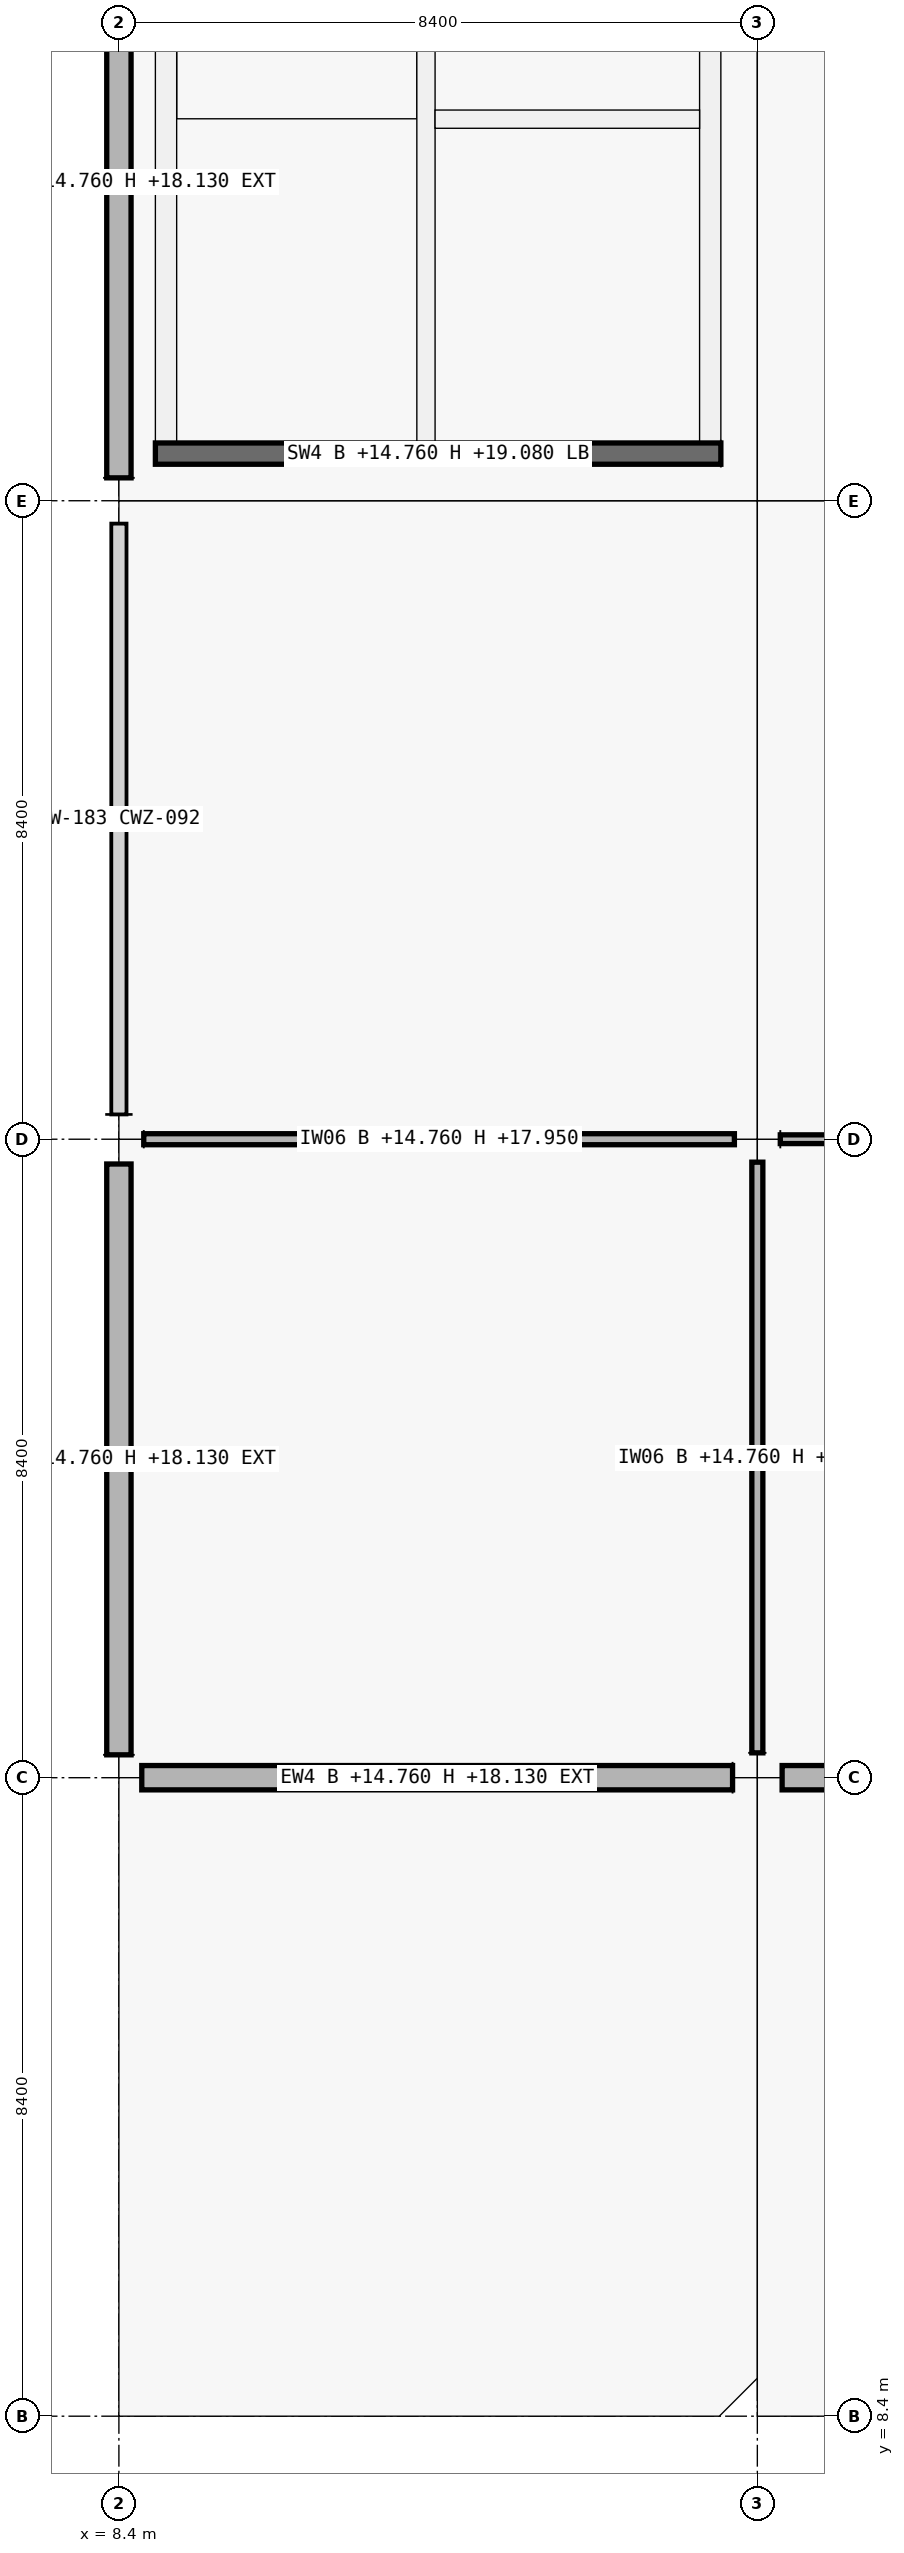
"""IFC4 building model, lengths in metres.
Left out: names, types, materials, properties, quantities, classifications, styles, units other than length and angle.
Written with IfcOpenShell. Run it as: python <this file> out.ifc"""

import sys

from ifc_helpers import new_model, si_unit, direction, frame, frame_2d, origin, origin_2d, place, context, subcontext, project, spatial, rectangle, extrude, element, fill, save


model = new_model("IFC4")
c1 = context("Model", 3, precision=1e-05, world=origin(), true_north=direction((0.0, 1.0)))
c2 = subcontext(c1, "Body", "Model", "MODEL_VIEW")
j1 = project(units=[si_unit("LENGTHUNIT", "METRE"), si_unit("PLANEANGLEUNIT", "RADIAN")], contexts=[c1])
p1 = place(None, origin())
s1 = spatial("IfcSite", under=j1, at=p1, CompositionType="ELEMENT")
p2 = place(p1, origin())
s2 = spatial("IfcBuilding", under=s1, at=p2, CompositionType="ELEMENT")
p3 = place(p2, frame((0.0, 0.0, 14.76)))
s3 = spatial("IfcBuildingStorey", under=s2, at=p3, CompositionType="ELEMENT", Elevation=14.76)
p4 = place(p3, frame((8.4, 16.8, 0.0), z_axis=(0.0, 0.0, 1.0), x_axis=(1.0, 0.0, 0.0)))
e1 = element("IfcColumn", 1, at=p4, inside=s3, PredefinedType="COLUMN", context=c2, shape_type="SweptSolid", body=[
    extrude(rectangle(XDim=0.6, YDim=0.6, at=origin_2d()), origin(), (0.0, 0.0, 1.0), 4.32),
])
p5 = place(p3, frame((8.4, 25.2, 0.0), z_axis=(0.0, 0.0, 1.0), x_axis=(1.0, 0.0, 0.0)))
e2 = element("IfcColumn", 2, at=p5, inside=s3, PredefinedType="COLUMN", context=c2, shape_type="SweptSolid", body=[
    extrude(rectangle(XDim=0.65, YDim=0.65, at=origin_2d()), origin(), (0.0, 0.0, 1.0), 4.32),
])
p6 = place(p3, frame((8.4, 33.6, 0.0), z_axis=(0.0, 0.0, 1.0), x_axis=(1.0, 0.0, 0.0)))
e3 = element("IfcColumn", 3, at=p6, inside=s3, PredefinedType="COLUMN", context=c2, shape_type="SweptSolid", body=[
    extrude(rectangle(XDim=0.6, YDim=0.6, at=origin_2d()), origin(), (0.0, 0.0, 1.0), 4.32),
])
p7 = place(p3, frame((16.8, 16.8, 0.0), z_axis=(0.0, 0.0, 1.0), x_axis=(1.0, 0.0, 0.0)))
e4 = element("IfcColumn", 4, at=p7, inside=s3, PredefinedType="COLUMN", context=c2, shape_type="SweptSolid", body=[
    extrude(rectangle(XDim=0.65, YDim=0.65, at=origin_2d()), origin(), (0.0, 0.0, 1.0), 4.32),
])
p8 = place(p3, frame((16.8, 25.2, 0.0), z_axis=(0.0, 0.0, 1.0), x_axis=(1.0, 0.0, 0.0)))
e5 = element("IfcColumn", 5, at=p8, inside=s3, PredefinedType="COLUMN", context=c2, shape_type="SweptSolid", body=[
    extrude(rectangle(XDim=0.6, YDim=0.6, at=origin_2d()), origin(), (0.0, 0.0, 1.0), 4.32),
])
p9 = place(p3, frame((16.8, 33.6, 0.0), z_axis=(0.0, 0.0, 1.0), x_axis=(1.0, 0.0, 0.0)))
e6 = element("IfcColumn", 6, at=p9, inside=s3, PredefinedType="COLUMN", context=c2, shape_type="SweptSolid", body=[
    extrude(rectangle(XDim=0.65, YDim=0.65, at=origin_2d()), origin(), (0.0, 0.0, 1.0), 4.32),
])
p10 = place(p3, frame((16.474, 16.8, 0.0), z_axis=(0.0, 0.0, 1.0), x_axis=(-1.0, 0.0, 0.0)))
e7 = element("IfcWall", 7, at=p10, inside=s3, PredefinedType="SOLIDWALL", context=c2, shape_type="SweptSolid", body=[
    extrude(rectangle(XDim=7.773, YDim=0.32, at=frame_2d((3.887, 0.0))), origin(), (0.0, 0.0, 1.0), 3.37),
])
p11 = place(p10, frame((2.962, 0.0, 0.0)))
e8 = element("IfcOpeningElement", 8, at=p11, cuts=e7, PredefinedType="OPENING", context=c2, shape_type="SweptSolid", body=[
    extrude(rectangle(XDim=1.85, YDim=2.2, at=frame_2d((0.925, 1.1))), frame((0.0, 0.16, 0.0), z_axis=(0.0, -1.0, 0.0), x_axis=(1.0, 0.0, 0.0)), (0.0, 0.0, 1.0), 0.32),
])
p12 = place(p3, frame((8.4, 17.101, 0.0), z_axis=(0.0, 0.0, 1.0), x_axis=(0.0, 1.0, 0.0)))
e9 = element("IfcWall", 9, at=p12, inside=s3, PredefinedType="SOLIDWALL", context=c2, shape_type="SweptSolid", body=[
    extrude(rectangle(XDim=7.773, YDim=0.32, at=frame_2d((3.886, 0.0))), origin(), (0.0, 0.0, 1.0), 3.37),
])
p13 = place(p12, frame((2.386, 0.0, 0.9)))
e10 = element("IfcOpeningElement", 10, at=p13, cuts=e9, PredefinedType="OPENING", context=c2, shape_type="SweptSolid", body=[
    extrude(rectangle(XDim=3.0, YDim=1.2, at=frame_2d((1.5, 0.6))), frame((0.0, 0.16, 0.0), z_axis=(0.0, -1.0, 0.0), x_axis=(1.0, 0.0, 0.0)), (0.0, 0.0, 1.0), 0.32),
])
p14 = place(p3, frame((8.4, 33.901, 0.0), z_axis=(0.0, 0.0, 1.0), x_axis=(0.0, 1.0, 0.0)))
e11 = element("IfcWall", 11, at=p14, inside=s3, PredefinedType="SOLIDWALL", context=c2, shape_type="SweptSolid", body=[
    extrude(rectangle(XDim=7.773, YDim=0.32, at=frame_2d((3.887, 0.0))), origin(), (0.0, 0.0, 1.0), 3.37),
])
p15 = place(p3, frame((24.899, 16.8, 0.0), z_axis=(0.0, 0.0, 1.0), x_axis=(-1.0, 0.0, 0.0)))
e12 = element("IfcWall", 12, at=p15, inside=s3, PredefinedType="SOLIDWALL", context=c2, shape_type="SweptSolid", body=[
    extrude(rectangle(XDim=7.773, YDim=0.32, at=frame_2d((3.886, 0.0))), origin(), (0.0, 0.0, 1.0), 3.37),
])
p16 = place(p15, frame((3.061, 0.0, 0.0)))
e13 = element("IfcOpeningElement", 13, at=p16, cuts=e12, PredefinedType="OPENING", context=c2, shape_type="SweptSolid", body=[
    extrude(rectangle(XDim=1.65, YDim=2.2, at=frame_2d((0.825, 1.1))), frame((0.0, 0.16, 0.0), z_axis=(0.0, -1.0, 0.0), x_axis=(1.0, 0.0, 0.0)), (0.0, 0.0, 1.0), 0.32),
])
p17 = place(p3, frame((16.32, 34.22, 0.0), z_axis=(0.0, 0.0, 1.0), x_axis=(-1.0, 0.0, 0.0)))
e14 = element("IfcWall", 14, at=p17, inside=s3, PredefinedType="SHEAR", context=c2, shape_type="SweptSolid", body=[
    extrude(rectangle(XDim=7.44, YDim=0.28, at=frame_2d((3.72, 0.0))), origin(), (0.0, 0.0, 1.0), 4.32),
])
p18 = place(p17, frame((1.28, 0.0, 0.0)))
e15 = element("IfcOpeningElement", 15, at=p18, cuts=e14, PredefinedType="OPENING", context=c2, shape_type="SweptSolid", body=[
    extrude(rectangle(XDim=1.5, YDim=2.15, at=frame_2d((0.75, 1.075))), frame((0.0, 0.14, 0.0), z_axis=(0.0, -1.0, 0.0), x_axis=(1.0, 0.0, 0.0)), (0.0, 0.0, 1.0), 0.28),
])
for number, where, z_axis, x_axis in (
    (16, (9.02, 34.36, 0.0), (0.0, 0.0, 1.0), (0.0, 1.0, 0.0)),
    (17, (16.18, 41.24, 0.0), (0.0, 0.0, 1.0), (0.0, -1.0, 0.0)),
):
    element("IfcWall", number, at=place(p3, frame(where, z_axis=z_axis, x_axis=x_axis)), inside=s3, PredefinedType="SHEAR", context=c2, shape_type="SweptSolid", body=[
        extrude(rectangle(XDim=6.88, YDim=0.28, at=frame_2d((3.44, 0.0))), origin(), (0.0, 0.0, 1.0), 4.32),
    ])
p19 = place(p3, frame((12.44, 34.36, 0.0), z_axis=(0.0, 0.0, 1.0), x_axis=(0.0, 1.0, 0.0)))
e18 = element("IfcWall", 18, at=p19, inside=s3, PredefinedType="SHEAR", context=c2, shape_type="SweptSolid", body=[
    extrude(rectangle(XDim=6.88, YDim=0.24, at=frame_2d((3.44, 0.0))), origin(), (0.0, 0.0, 1.0), 4.32),
])
p20 = place(p19, frame((0.12, 0.0, 0.0)))
e19 = element("IfcOpeningElement", 19, at=p20, cuts=e18, PredefinedType="OPENING", context=c2, shape_type="SweptSolid", body=[
    extrude(rectangle(XDim=1.0, YDim=2.15, at=frame_2d((0.5, 1.075))), frame((0.0, 0.12, 0.0), z_axis=(0.0, -1.0, 0.0), x_axis=(1.0, 0.0, 0.0)), (0.0, 0.0, 1.0), 0.24),
])
p21 = place(p3, frame((12.56, 38.62, 0.0), z_axis=(0.0, 0.0, 1.0), x_axis=(1.0, 0.0, 0.0)))
e20 = element("IfcWall", 20, at=p21, inside=s3, PredefinedType="SHEAR", context=c2, shape_type="SweptSolid", body=[
    extrude(rectangle(XDim=3.48, YDim=0.24, at=frame_2d((1.74, 0.0))), origin(), (0.0, 0.0, 1.0), 4.32),
])
p22 = place(p21, frame((1.19, 0.0, 0.0)))
e21 = element("IfcOpeningElement", 21, at=p22, cuts=e20, PredefinedType="OPENING", context=c2, shape_type="SweptSolid", body=[
    extrude(rectangle(XDim=1.1, YDim=2.15, at=frame_2d((0.55, 1.075))), frame((0.0, 0.12, 0.0), z_axis=(0.0, -1.0, 0.0), x_axis=(1.0, 0.0, 0.0)), (0.0, 0.0, 1.0), 0.24),
])
p23 = place(p3, frame((8.727, 25.2, 0.0), z_axis=(0.0, 0.0, 1.0), x_axis=(1.0, 0.0, 0.0)))
e22 = element("IfcWall", 22, at=p23, inside=s3, PredefinedType="PARTITIONING", context=c2, shape_type="SweptSolid", body=[
    extrude(rectangle(XDim=7.771, YDim=0.145, at=frame_2d((3.885, 0.0))), origin(), (0.0, 0.0, 1.0), 3.19),
])
p24 = place(p23, frame((3.401, 0.0, 0.0)))
e23 = element("IfcOpeningElement", 23, at=p24, cuts=e22, PredefinedType="OPENING", context=c2, shape_type="SweptSolid", body=[
    extrude(rectangle(XDim=0.97, YDim=2.12, at=frame_2d((0.485, 1.06))), frame((0.0, 0.073, 0.0), z_axis=(0.0, -1.0, 0.0), x_axis=(1.0, 0.0, 0.0)), (0.0, 0.0, 1.0), 0.145),
])
p25 = place(p3, frame((17.102, 25.2, 0.0), z_axis=(0.0, 0.0, 1.0), x_axis=(1.0, 0.0, 0.0)))
e24 = element("IfcWall", 24, at=p25, inside=s3, PredefinedType="PARTITIONING", context=c2, shape_type="SweptSolid", body=[
    extrude(rectangle(XDim=7.771, YDim=0.115, at=frame_2d((3.885, 0.0))), origin(), (0.0, 0.0, 1.0), 3.19),
])
p26 = place(p25, frame((3.345, 0.0, 0.0)))
e25 = element("IfcOpeningElement", 25, at=p26, cuts=e24, PredefinedType="OPENING", context=c2, shape_type="SweptSolid", body=[
    extrude(rectangle(XDim=1.08, YDim=2.25, at=frame_2d((0.54, 1.125))), frame((0.0, 0.058, 0.0), z_axis=(0.0, -1.0, 0.0), x_axis=(1.0, 0.0, 0.0)), (0.0, 0.0, 1.0), 0.115),
])
p27 = place(p3, frame((16.8, 17.127, 0.0), z_axis=(0.0, 0.0, 1.0), x_axis=(0.0, 1.0, 0.0)))
e26 = element("IfcWall", 26, at=p27, inside=s3, PredefinedType="PARTITIONING", context=c2, shape_type="SweptSolid", body=[
    extrude(rectangle(XDim=7.771, YDim=0.145, at=frame_2d((3.885, 0.0))), origin(), (0.0, 0.0, 1.0), 3.19),
])
p28 = place(p27, frame((3.421, 0.0, 0.0)))
e27 = element("IfcOpeningElement", 27, at=p28, cuts=e26, PredefinedType="OPENING", context=c2, shape_type="SweptSolid", body=[
    extrude(rectangle(XDim=0.93, YDim=2.12, at=frame_2d((0.465, 1.06))), frame((0.0, 0.073, 0.0), z_axis=(0.0, -1.0, 0.0), x_axis=(1.0, 0.0, 0.0)), (0.0, 0.0, 1.0), 0.145),
])
p29 = place(p11, origin())
e28 = element("IfcDoor", 28, at=p29, inside=s3, OperationType="DOUBLE_DOOR_SINGLE_SWING", PredefinedType="DOOR", context=c2, shape_type="SweptSolid", body=[
    extrude(rectangle(XDim=1.85, YDim=2.2, at=frame_2d((0.925, 1.1))), frame((0.0, 0.025, 0.0), z_axis=(0.0, -1.0, 0.0), x_axis=(1.0, 0.0, 0.0)), (0.0, 0.0, 1.0), 0.05),
])
fill(e8, e28)
p30 = place(p13, origin())
e29 = element("IfcWindow", 29, at=p30, inside=s3, PartitioningType="SINGLE_PANEL", PredefinedType="WINDOW", context=c2, shape_type="SweptSolid", body=[
    extrude(rectangle(XDim=3.0, YDim=1.2, at=frame_2d((1.5, 0.6))), frame((0.0, 0.03, 0.0), z_axis=(0.0, -1.0, 0.0), x_axis=(1.0, 0.0, 0.0)), (0.0, 0.0, 1.0), 0.06),
])
fill(e10, e29)
p31 = place(p20, origin())
e30 = element("IfcDoor", 30, at=p31, inside=s3, OperationType="SINGLE_SWING_RIGHT", PredefinedType="DOOR", context=c2, shape_type="SweptSolid", body=[
    extrude(rectangle(XDim=1.0, YDim=2.15, at=frame_2d((0.5, 1.075))), frame((0.0, 0.025, 0.0), z_axis=(0.0, -1.0, 0.0), x_axis=(1.0, 0.0, 0.0)), (0.0, 0.0, 1.0), 0.05),
])
fill(e19, e30)
p32 = place(p18, origin())
e31 = element("IfcDoor", 31, at=p32, inside=s3, OperationType="DOUBLE_DOOR_SINGLE_SWING", PredefinedType="DOOR", context=c2, shape_type="SweptSolid", body=[
    extrude(rectangle(XDim=1.5, YDim=2.15, at=frame_2d((0.75, 1.075))), frame((0.0, 0.025, 0.0), z_axis=(0.0, -1.0, 0.0), x_axis=(1.0, 0.0, 0.0)), (0.0, 0.0, 1.0), 0.05),
])
fill(e15, e31)
p33 = place(p22, origin())
e32 = element("IfcDoor", 32, at=p33, inside=s3, OperationType="DOUBLE_DOOR_SLIDING", PredefinedType="DOOR", context=c2, shape_type="SweptSolid", body=[
    extrude(rectangle(XDim=1.1, YDim=2.15, at=frame_2d((0.55, 1.075))), frame((0.0, 0.025, 0.0), z_axis=(0.0, -1.0, 0.0), x_axis=(1.0, 0.0, 0.0)), (0.0, 0.0, 1.0), 0.05),
])
fill(e21, e32)
p34 = place(p24, origin())
e33 = element("IfcDoor", 33, at=p34, inside=s3, OperationType="SINGLE_SWING_RIGHT", PredefinedType="DOOR", context=c2, shape_type="SweptSolid", body=[
    extrude(rectangle(XDim=0.97, YDim=2.12, at=frame_2d((0.485, 1.06))), frame((0.0, 0.025, 0.0), z_axis=(0.0, -1.0, 0.0), x_axis=(1.0, 0.0, 0.0)), (0.0, 0.0, 1.0), 0.05),
])
fill(e23, e33)
p35 = place(p28, origin())
e34 = element("IfcDoor", 34, at=p35, inside=s3, OperationType="SINGLE_SWING_RIGHT", PredefinedType="DOOR", context=c2, shape_type="SweptSolid", body=[
    extrude(rectangle(XDim=0.93, YDim=2.12, at=frame_2d((0.465, 1.06))), frame((0.0, 0.025, 0.0), z_axis=(0.0, -1.0, 0.0), x_axis=(1.0, 0.0, 0.0)), (0.0, 0.0, 1.0), 0.05),
])
fill(e27, e34)
save(model, sys.argv[1])
